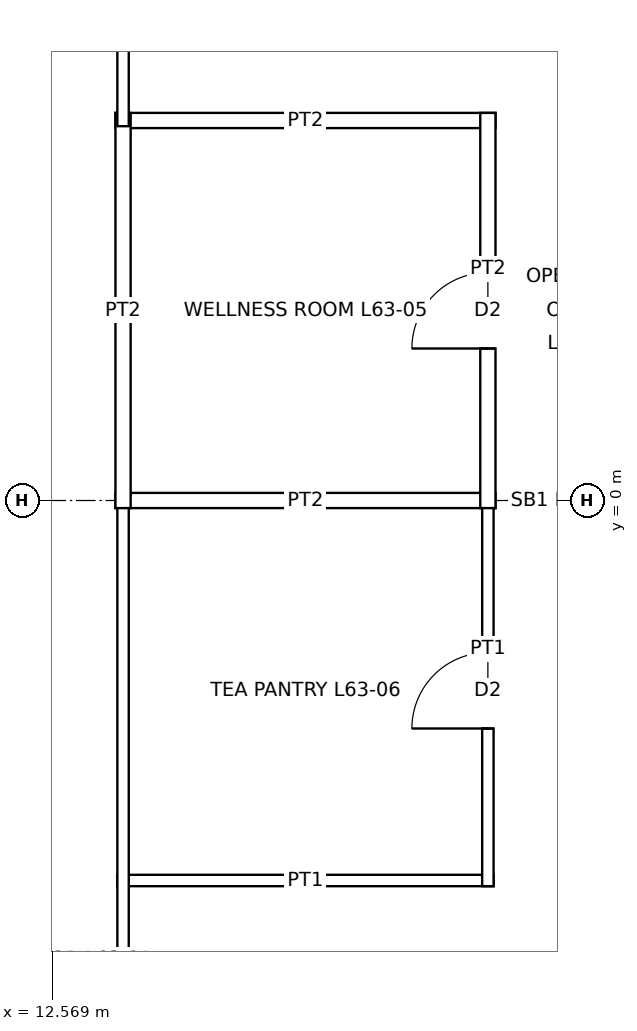
"""IFC4 building model, lengths in metres.
Left out: names, types, materials, properties, quantities, classifications, styles, units other than length and angle.
Written with IfcOpenShell. Run it as: python <this file> out.ifc"""

import sys

from ifc_helpers import new_model, si_unit, direction, frame, frame_2d, origin, place, context, subcontext, project, spatial, rectangle, extrude, element, fill, save


model = new_model("IFC4")
c1 = context("Model", 3, precision=1e-05, world=origin(), true_north=direction((0.0, 1.0)))
c2 = subcontext(c1, "Body", "Model", "MODEL_VIEW")
j1 = project(units=[si_unit("LENGTHUNIT", "METRE"), si_unit("PLANEANGLEUNIT", "RADIAN")], contexts=[c1])
p1 = place(None, origin())
s1 = spatial("IfcSite", under=j1, at=p1, CompositionType="ELEMENT")
p2 = place(p1, origin())
s2 = spatial("IfcBuilding", under=s1, at=p2, CompositionType="ELEMENT")
p3 = place(p2, frame((0.0, 0.0, 287.9)))
s3 = spatial("IfcBuildingStorey", under=s2, at=p3, CompositionType="ELEMENT", Elevation=287.9)
p4 = place(p3, frame((13.425, -5.0, 0.0), z_axis=(0.0, 0.0, 1.0), x_axis=(1.0, 0.0, 0.0)))
e1 = element("IfcWall", 1, at=p4, inside=s3, PredefinedType="PARTITIONING", context=c2, shape_type="SweptSolid", body=[
    extrude(rectangle(XDim=4.95, YDim=0.15, at=frame_2d((2.475, 0.0))), origin(), (0.0, 0.0, 1.0), 3.85),
])
p5 = place(p3, frame((13.4, 0.0, 0.0), z_axis=(0.0, 0.0, 1.0), x_axis=(1.0, 0.0, 0.0)))
e2 = element("IfcWall", 2, at=p5, inside=s3, PredefinedType="PARTITIONING", context=c2, shape_type="SweptSolid", body=[
    extrude(rectangle(XDim=5.0, YDim=0.2, at=frame_2d((2.5, 0.0))), origin(), (0.0, 0.0, 1.0), 3.243),
])
p6 = place(p3, frame((13.4, 5.0, 0.0), z_axis=(0.0, 0.0, 1.0), x_axis=(1.0, 0.0, 0.0)))
e3 = element("IfcWall", 3, at=p6, inside=s3, PredefinedType="PARTITIONING", context=c2, shape_type="SweptSolid", body=[
    extrude(rectangle(XDim=5.0, YDim=0.2, at=frame_2d((2.5, 0.0))), origin(), (0.0, 0.0, 1.0), 3.85),
])
p7 = place(p3, frame((13.5, -13.575, 0.0), z_axis=(0.0, 0.0, 1.0), x_axis=(0.0, 1.0, 0.0)))
e4 = element("IfcWall", 4, at=p7, inside=s3, PredefinedType="PARTITIONING", context=c2, shape_type="SweptSolid", body=[
    extrude(rectangle(XDim=13.65, YDim=0.15, at=frame_2d((6.825, 0.0))), origin(), (0.0, 0.0, 1.0), 3.85),
])
p8 = place(p7, frame((3.825, 0.0, 0.0)))
e5 = element("IfcOpeningElement", 5, at=p8, cuts=e4, PredefinedType="OPENING", context=c2, shape_type="SweptSolid", body=[
    extrude(rectangle(XDim=1.0, YDim=2.4, at=frame_2d((0.5, 1.2))), frame((0.0, 0.085, 0.0), z_axis=(0.0, -1.0, 0.0), x_axis=(1.0, 0.0, 0.0)), (0.0, 0.0, 1.0), 0.17),
])
p9 = place(p3, frame((13.5, -0.1, 0.0), z_axis=(0.0, 0.0, 1.0), x_axis=(0.0, 1.0, 0.0)))
e6 = element("IfcWall", 6, at=p9, inside=s3, PredefinedType="PARTITIONING", context=c2, shape_type="SweptSolid", body=[
    extrude(rectangle(XDim=5.2, YDim=0.2, at=frame_2d((2.6, 0.0))), origin(), (0.0, 0.0, 1.0), 3.85),
])
p10 = place(p3, frame((13.5, 4.925, 0.0), z_axis=(0.0, 0.0, 1.0), x_axis=(0.0, 1.0, 0.0)))
e7 = element("IfcWall", 7, at=p10, inside=s3, PredefinedType="PARTITIONING", context=c2, shape_type="SweptSolid", body=[
    extrude(rectangle(XDim=7.15, YDim=0.15, at=frame_2d((3.575, 0.0))), origin(), (0.0, 0.0, 1.0), 3.85),
])
p11 = place(p3, frame((18.3, -5.075, 0.0), z_axis=(0.0, 0.0, 1.0), x_axis=(0.0, 1.0, 0.0)))
e8 = element("IfcWall", 8, at=p11, inside=s3, PredefinedType="PARTITIONING", context=c2, shape_type="SweptSolid", body=[
    extrude(rectangle(XDim=5.15, YDim=0.15, at=frame_2d((2.575, 0.0))), origin(), (0.0, 0.0, 1.0), 3.85),
])
p12 = place(p11, frame((2.075, 0.0, 0.0)))
e9 = element("IfcOpeningElement", 9, at=p12, cuts=e8, PredefinedType="OPENING", context=c2, shape_type="SweptSolid", body=[
    extrude(rectangle(XDim=1.0, YDim=2.1, at=frame_2d((0.5, 1.05))), frame((0.0, 0.085, 0.0), z_axis=(0.0, -1.0, 0.0), x_axis=(1.0, 0.0, 0.0)), (0.0, 0.0, 1.0), 0.17),
])
p13 = place(p3, frame((18.3, -0.1, 0.0), z_axis=(0.0, 0.0, 1.0), x_axis=(0.0, 1.0, 0.0)))
e10 = element("IfcWall", 10, at=p13, inside=s3, PredefinedType="PARTITIONING", context=c2, shape_type="SweptSolid", body=[
    extrude(rectangle(XDim=5.2, YDim=0.2, at=frame_2d((2.6, 0.0))), origin(), (0.0, 0.0, 1.0), 3.85),
])
p14 = place(p13, frame((2.1, 0.0, 0.0)))
e11 = element("IfcOpeningElement", 11, at=p14, cuts=e10, PredefinedType="OPENING", context=c2, shape_type="SweptSolid", body=[
    extrude(rectangle(XDim=1.0, YDim=2.1, at=frame_2d((0.5, 1.05))), frame((0.0, 0.11, 0.0), z_axis=(0.0, -1.0, 0.0), x_axis=(1.0, 0.0, 0.0)), (0.0, 0.0, 1.0), 0.22),
])
p15 = place(p14, origin())
e12 = element("IfcDoor", 12, at=p15, inside=s3, OperationType="SINGLE_SWING_LEFT", PredefinedType="DOOR", context=c2, shape_type="SweptSolid", body=[
    extrude(rectangle(XDim=1.0, YDim=2.1, at=frame_2d((0.5, 1.05))), frame((0.0, 0.025, 0.0), z_axis=(0.0, -1.0, 0.0), x_axis=(1.0, 0.0, 0.0)), (0.0, 0.0, 1.0), 0.05),
])
fill(e11, e12)
p16 = place(p12, origin())
e13 = element("IfcDoor", 13, at=p16, inside=s3, OperationType="SINGLE_SWING_LEFT", PredefinedType="DOOR", context=c2, shape_type="SweptSolid", body=[
    extrude(rectangle(XDim=1.0, YDim=2.1, at=frame_2d((0.5, 1.05))), frame((0.0, 0.025, 0.0), z_axis=(0.0, -1.0, 0.0), x_axis=(1.0, 0.0, 0.0)), (0.0, 0.0, 1.0), 0.05),
])
fill(e9, e13)
save(model, sys.argv[1])
